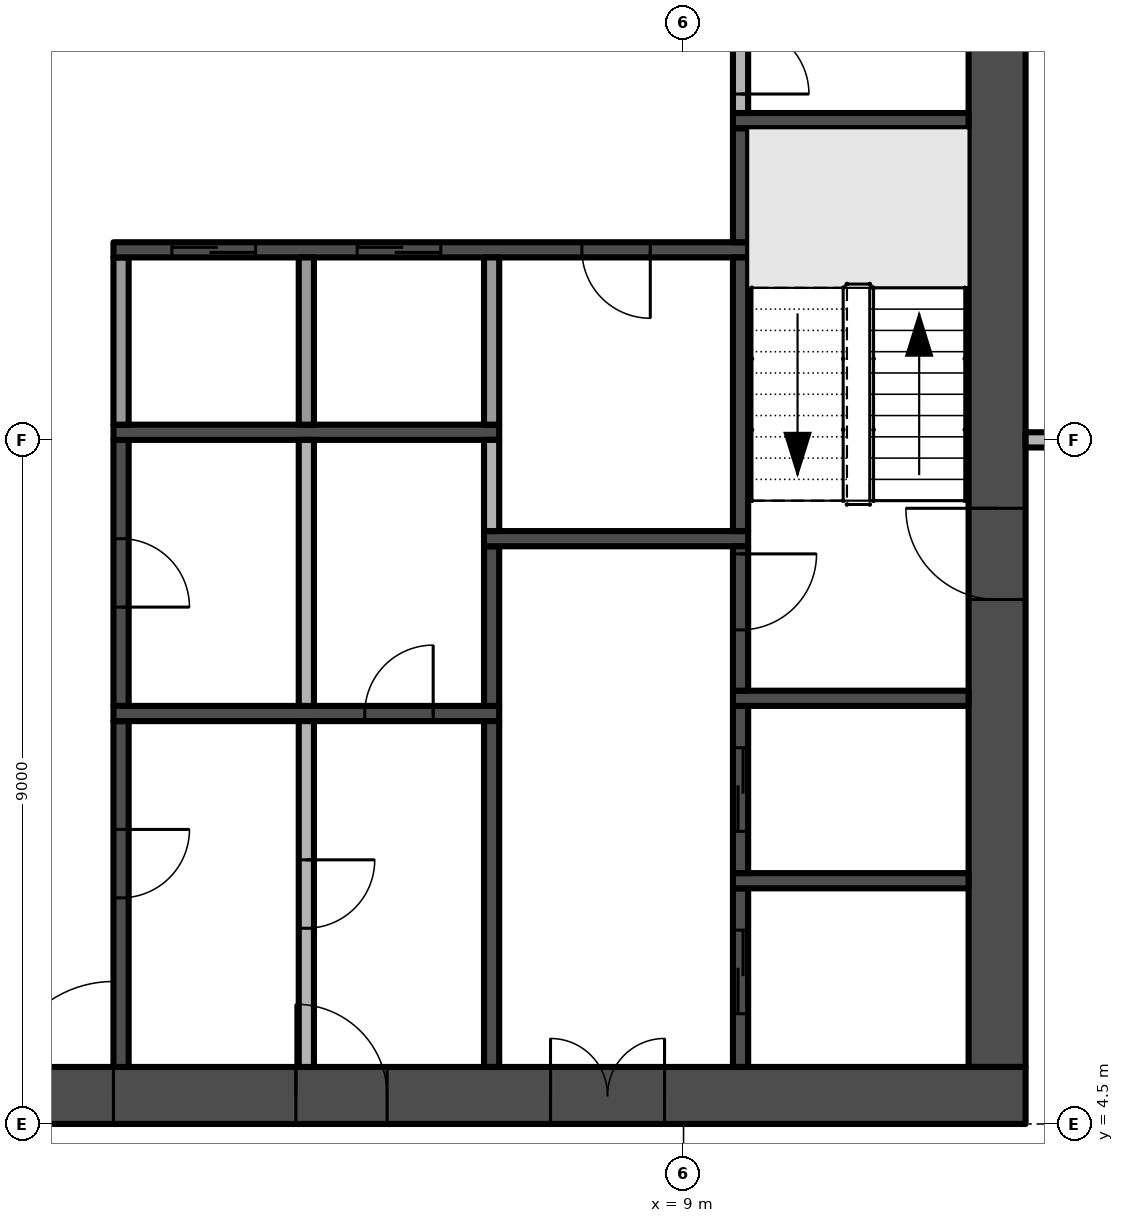
"""IFC4 building model, lengths in metres.
Left out: names, types, materials, properties, quantities, classifications, styles, units other than length and angle.
Written with IfcOpenShell. Run it as: python <this file> out.ifc"""

import sys

from ifc_helpers import new_model, si_unit, direction, frame, frame_2d, origin, place, context, subcontext, project, spatial, rectangle, extrude, element, fill, save


model = new_model("IFC4")
c1 = context("Model", 3, precision=1e-05, world=origin(), true_north=direction((0.0, 1.0)))
c2 = subcontext(c1, "Body", "Model", "MODEL_VIEW")
j1 = project(units=[si_unit("LENGTHUNIT", "METRE"), si_unit("PLANEANGLEUNIT", "RADIAN")], contexts=[c1])
p1 = place(None, origin())
s1 = spatial("IfcSite", under=j1, at=p1, CompositionType="ELEMENT")
p2 = place(p1, origin())
s2 = spatial("IfcBuilding", under=s1, at=p2, CompositionType="ELEMENT")
p3 = place(p2, frame((0.0, 0.0, 136.4)))
s3 = spatial("IfcBuildingStorey", under=s2, at=p3, CompositionType="ELEMENT", Elevation=136.4)
p4 = place(p3, frame((-13.5, 4.875, -0.3), z_axis=(0.0, 0.0, 1.0), x_axis=(1.0, 0.0, 0.0)))
e1 = element("IfcWall", 1, at=p4, inside=s3, PredefinedType="SHEAR", context=c2, shape_type="SweptSolid", body=[
    extrude(rectangle(XDim=27.0, YDim=0.75, at=frame_2d((13.5, 0.0))), origin(), (0.0, 0.0, 1.0), 3.8),
])
p5 = place(p4, frame((12.0, 0.0, 0.3)))
e2 = element("IfcOpeningElement", 2, at=p5, cuts=e1, PredefinedType="OPENING", context=c2, shape_type="SweptSolid", body=[
    extrude(rectangle(XDim=3.0, YDim=2.4, at=frame_2d((1.5, 1.2))), frame((0.0, 0.385, 0.0), z_axis=(0.0, -1.0, 0.0), x_axis=(1.0, 0.0, 0.0)), (0.0, 0.0, 1.0), 0.77),
])
p6 = place(p4, frame((4.9, 0.0, 0.3)))
e3 = element("IfcOpeningElement", 3, at=p6, cuts=e1, PredefinedType="OPENING", context=c2, shape_type="SweptSolid", body=[
    extrude(rectangle(XDim=1.2, YDim=2.2, at=frame_2d((0.6, 1.1))), frame((0.0, 0.385, 0.0), z_axis=(0.0, -1.0, 0.0), x_axis=(1.0, 0.0, 0.0)), (0.0, 0.0, 1.0), 0.77),
])
p7 = place(p4, frame((20.75, 0.0, 0.3)))
e4 = element("IfcOpeningElement", 4, at=p7, cuts=e1, PredefinedType="OPENING", context=c2, shape_type="SweptSolid", body=[
    extrude(rectangle(XDim=1.5, YDim=2.2, at=frame_2d((0.75, 1.1))), frame((0.0, 0.385, 0.0), z_axis=(0.0, -1.0, 0.0), x_axis=(1.0, 0.0, 0.0)), (0.0, 0.0, 1.0), 0.77),
])
p8 = place(p4, frame((17.4, 0.0, 0.3)))
e5 = element("IfcOpeningElement", 5, at=p8, cuts=e1, PredefinedType="OPENING", context=c2, shape_type="SweptSolid", body=[
    extrude(rectangle(XDim=1.2, YDim=2.2, at=frame_2d((0.6, 1.1))), frame((0.0, 0.385, 0.0), z_axis=(0.0, -1.0, 0.0), x_axis=(1.0, 0.0, 0.0)), (0.0, 0.0, 1.0), 0.77),
])
p9 = place(p3, frame((13.125, 5.25, -0.3), z_axis=(0.0, 0.0, 1.0), x_axis=(0.0, 1.0, 0.0)))
e6 = element("IfcWall", 6, at=p9, inside=s3, PredefinedType="SHEAR", context=c2, shape_type="SweptSolid", body=[
    extrude(rectangle(XDim=16.5, YDim=0.75, at=frame_2d((8.25, 0.0))), origin(), (0.0, 0.0, 1.0), 3.8),
])
p10 = place(p9, frame((6.15, 0.0, 0.3)))
e7 = element("IfcOpeningElement", 7, at=p10, cuts=e6, PredefinedType="OPENING", context=c2, shape_type="SweptSolid", body=[
    extrude(rectangle(XDim=1.2, YDim=2.2, at=frame_2d((0.6, 1.1))), frame((0.0, 0.385, 0.0), z_axis=(0.0, -1.0, 0.0), x_axis=(1.0, 0.0, 0.0)), (0.0, 0.0, 1.0), 0.77),
])
p11 = place(p3, frame((1.6, 9.8, 0.0), z_axis=(0.0, 0.0, 1.0), x_axis=(0.0, -1.0, 0.0)))
e8 = element("IfcWall", 8, at=p11, inside=s3, PredefinedType="SHEAR", context=c2, shape_type="SweptSolid", body=[
    extrude(rectangle(XDim=4.55, YDim=0.2, at=frame_2d((2.275, 0.0))), origin(), (0.0, 0.0, 1.0), 3.5),
])
p12 = place(p11, frame((1.425, 0.0, 0.0)))
e9 = element("IfcOpeningElement", 9, at=p12, cuts=e8, PredefinedType="OPENING", context=c2, shape_type="SweptSolid", body=[
    extrude(rectangle(XDim=0.9, YDim=2.1, at=frame_2d((0.45, 1.05))), frame((0.0, 0.11, 0.0), z_axis=(0.0, -1.0, 0.0), x_axis=(1.0, 0.0, 0.0)), (0.0, 0.0, 1.0), 0.22),
])
p13 = place(p3, frame((1.5, 9.9, 0.0), z_axis=(0.0, 0.0, 1.0), x_axis=(1.0, 0.0, 0.0)))
e10 = element("IfcWall", 10, at=p13, inside=s3, PredefinedType="SHEAR", context=c2, shape_type="SweptSolid", body=[
    extrude(rectangle(XDim=5.075, YDim=0.2, at=frame_2d((2.538, 0.0))), origin(), (0.0, 0.0, 1.0), 3.5),
])
p14 = place(p13, frame((3.306, 0.0, 0.0)))
e11 = element("IfcOpeningElement", 11, at=p14, cuts=e10, PredefinedType="OPENING", context=c2, shape_type="SweptSolid", body=[
    extrude(rectangle(XDim=0.9, YDim=2.1, at=frame_2d((0.45, 1.05))), frame((0.0, 0.11, 0.0), z_axis=(0.0, -1.0, 0.0), x_axis=(1.0, 0.0, 0.0)), (0.0, 0.0, 1.0), 0.22),
])
p15 = place(p3, frame((1.6, 13.5, 0.0), z_axis=(0.0, 0.0, 1.0), x_axis=(0.0, -1.0, 0.0)))
e12 = element("IfcWall", 12, at=p15, inside=s3, PredefinedType="SHEAR", context=c2, shape_type="SweptSolid", body=[
    extrude(rectangle(XDim=3.5, YDim=0.2, at=frame_2d((1.75, 0.0))), origin(), (0.0, 0.0, 1.0), 3.5),
])
p16 = place(p15, frame((1.3, 0.0, 0.0)))
e13 = element("IfcOpeningElement", 13, at=p16, cuts=e12, PredefinedType="OPENING", context=c2, shape_type="SweptSolid", body=[
    extrude(rectangle(XDim=0.9, YDim=2.1, at=frame_2d((0.45, 1.05))), frame((0.0, 0.11, 0.0), z_axis=(0.0, -1.0, 0.0), x_axis=(1.0, 0.0, 0.0)), (0.0, 0.0, 1.0), 0.22),
])
p17 = place(p3, frame((1.5, 13.6, 0.0), z_axis=(0.0, 0.0, 1.0), x_axis=(1.0, 0.0, 0.0)))
e14 = element("IfcWall", 14, at=p17, inside=s3, PredefinedType="SHEAR", context=c2, shape_type="SweptSolid", body=[
    extrude(rectangle(XDim=5.075, YDim=0.2, at=frame_2d((2.538, 0.0))), origin(), (0.0, 0.0, 1.0), 3.5),
])
p18 = place(p3, frame((1.6, 13.7, 0.0), z_axis=(0.0, 0.0, 1.0), x_axis=(0.0, 1.0, 0.0)))
e15 = element("IfcWall", 15, at=p18, inside=s3, PredefinedType="PARTITIONING", context=c2, shape_type="SweptSolid", body=[
    extrude(rectangle(XDim=2.2, YDim=0.2, at=frame_2d((1.1, 0.0))), origin(), (0.0, 0.0, 1.0), 3.5),
])
p19 = place(p3, frame((9.85, 16.0, 0.0), z_axis=(0.0, 0.0, 1.0), x_axis=(-1.0, 0.0, 0.0)))
e16 = element("IfcWall", 16, at=p19, inside=s3, PredefinedType="SHEAR", context=c2, shape_type="SweptSolid", body=[
    extrude(rectangle(XDim=8.35, YDim=0.2, at=frame_2d((4.175, 0.0))), origin(), (0.0, 0.0, 1.0), 3.5),
])
p20 = place(p19, frame((6.481, 0.0, 0.0)))
e17 = element("IfcOpeningElement", 17, at=p20, cuts=e16, PredefinedType="OPENING", context=c2, shape_type="SweptSolid", body=[
    extrude(rectangle(XDim=1.1, YDim=2.1, at=frame_2d((0.55, 1.05))), frame((0.0, 0.11, 0.0), z_axis=(0.0, -1.0, 0.0), x_axis=(1.0, 0.0, 0.0)), (0.0, 0.0, 1.0), 0.22),
])
p21 = place(p19, frame((4.044, 0.0, 0.0)))
e18 = element("IfcOpeningElement", 18, at=p21, cuts=e16, PredefinedType="OPENING", context=c2, shape_type="SweptSolid", body=[
    extrude(rectangle(XDim=1.1, YDim=2.1, at=frame_2d((0.55, 1.05))), frame((0.0, 0.11, 0.0), z_axis=(0.0, -1.0, 0.0), x_axis=(1.0, 0.0, 0.0)), (0.0, 0.0, 1.0), 0.22),
])
p22 = place(p19, frame((1.288, 0.0, 0.0)))
e19 = element("IfcOpeningElement", 19, at=p22, cuts=e16, PredefinedType="OPENING", context=c2, shape_type="SweptSolid", body=[
    extrude(rectangle(XDim=0.9, YDim=2.1, at=frame_2d((0.45, 1.05))), frame((0.0, 0.11, 0.0), z_axis=(0.0, -1.0, 0.0), x_axis=(1.0, 0.0, 0.0)), (0.0, 0.0, 1.0), 0.22),
])
p23 = place(p3, frame((4.037, 9.8, 0.0), z_axis=(0.0, 0.0, 1.0), x_axis=(0.0, -1.0, 0.0)))
e20 = element("IfcWall", 20, at=p23, inside=s3, PredefinedType="PARTITIONING", context=c2, shape_type="SweptSolid", body=[
    extrude(rectangle(XDim=4.55, YDim=0.2, at=frame_2d((2.275, 0.0))), origin(), (0.0, 0.0, 1.0), 3.5),
])
p24 = place(p23, frame((1.825, 0.0, 0.0)))
e21 = element("IfcOpeningElement", 21, at=p24, cuts=e20, PredefinedType="OPENING", context=c2, shape_type="SweptSolid", body=[
    extrude(rectangle(XDim=0.9, YDim=2.1, at=frame_2d((0.45, 1.05))), frame((0.0, 0.11, 0.0), z_axis=(0.0, -1.0, 0.0), x_axis=(1.0, 0.0, 0.0)), (0.0, 0.0, 1.0), 0.22),
])
p25 = place(p3, frame((4.037, 10.0, 0.0), z_axis=(0.0, 0.0, 1.0), x_axis=(0.0, 1.0, 0.0)))
e22 = element("IfcWall", 22, at=p25, inside=s3, PredefinedType="PARTITIONING", context=c2, shape_type="SweptSolid", body=[
    extrude(rectangle(XDim=3.5, YDim=0.2, at=frame_2d((1.75, 0.0))), origin(), (0.0, 0.0, 1.0), 3.5),
])
p26 = place(p3, frame((4.037, 13.7, 0.0), z_axis=(0.0, 0.0, 1.0), x_axis=(0.0, 1.0, 0.0)))
e23 = element("IfcWall", 23, at=p26, inside=s3, PredefinedType="PARTITIONING", context=c2, shape_type="SweptSolid", body=[
    extrude(rectangle(XDim=2.2, YDim=0.2, at=frame_2d((1.1, 0.0))), origin(), (0.0, 0.0, 1.0), 3.5),
])
p27 = place(p3, frame((6.475, 5.25, 0.0), z_axis=(0.0, 0.0, 1.0), x_axis=(0.0, 1.0, 0.0)))
e24 = element("IfcWall", 24, at=p27, inside=s3, PredefinedType="SHEAR", context=c2, shape_type="SweptSolid", body=[
    extrude(rectangle(XDim=4.55, YDim=0.2, at=frame_2d((2.275, 0.0))), origin(), (0.0, 0.0, 1.0), 3.5),
])
p28 = place(p3, frame((6.475, 10.0, 0.0), z_axis=(0.0, 0.0, 1.0), x_axis=(0.0, 1.0, 0.0)))
e25 = element("IfcWall", 25, at=p28, inside=s3, PredefinedType="SHEAR", context=c2, shape_type="SweptSolid", body=[
    extrude(rectangle(XDim=2.1, YDim=0.2, at=frame_2d((1.05, 0.0))), origin(), (0.0, 0.0, 1.0), 3.5),
])
p29 = place(p3, frame((6.375, 12.2, 0.0), z_axis=(0.0, 0.0, 1.0), x_axis=(1.0, 0.0, 0.0)))
e26 = element("IfcWall", 26, at=p29, inside=s3, PredefinedType="SHEAR", context=c2, shape_type="SweptSolid", body=[
    extrude(rectangle(XDim=3.475, YDim=0.2, at=frame_2d((1.738, 0.0))), origin(), (0.0, 0.0, 1.0), 3.5),
])
p30 = place(p3, frame((6.475, 12.3, 0.0), z_axis=(0.0, 0.0, 1.0), x_axis=(0.0, 1.0, 0.0)))
e27 = element("IfcWall", 27, at=p30, inside=s3, PredefinedType="PARTITIONING", context=c2, shape_type="SweptSolid", body=[
    extrude(rectangle(XDim=1.2, YDim=0.2, at=frame_2d((0.6, 0.0))), origin(), (0.0, 0.0, 1.0), 3.5),
])
p31 = place(p3, frame((6.475, 13.7, 0.0), z_axis=(0.0, 0.0, 1.0), x_axis=(0.0, 1.0, 0.0)))
e28 = element("IfcWall", 28, at=p31, inside=s3, PredefinedType="PARTITIONING", context=c2, shape_type="SweptSolid", body=[
    extrude(rectangle(XDim=2.2, YDim=0.2, at=frame_2d((1.1, 0.0))), origin(), (0.0, 0.0, 1.0), 3.5),
])
p32 = place(p3, frame((9.75, 5.25, 0.0), z_axis=(0.0, 0.0, 1.0), x_axis=(0.0, 1.0, 0.0)))
e29 = element("IfcWall", 29, at=p32, inside=s3, PredefinedType="SHEAR", context=c2, shape_type="SweptSolid", body=[
    extrude(rectangle(XDim=2.35, YDim=0.2, at=frame_2d((1.175, 0.0))), origin(), (0.0, 0.0, 1.0), 3.5),
])
p33 = place(p32, frame((0.7, 0.0, 0.0)))
e30 = element("IfcOpeningElement", 30, at=p33, cuts=e29, PredefinedType="OPENING", context=c2, shape_type="SweptSolid", body=[
    extrude(rectangle(XDim=1.1, YDim=2.1, at=frame_2d((0.55, 1.05))), frame((0.0, 0.11, 0.0), z_axis=(0.0, -1.0, 0.0), x_axis=(1.0, 0.0, 0.0)), (0.0, 0.0, 1.0), 0.22),
])
p34 = place(p3, frame((9.65, 7.7, 0.0), z_axis=(0.0, 0.0, 1.0), x_axis=(1.0, 0.0, 0.0)))
e31 = element("IfcWall", 31, at=p34, inside=s3, PredefinedType="SHEAR", context=c2, shape_type="SweptSolid", body=[
    extrude(rectangle(XDim=3.1, YDim=0.2, at=frame_2d((1.55, 0.0))), origin(), (0.0, 0.0, 1.0), 3.5),
])
p35 = place(p3, frame((9.75, 7.8, 0.0), z_axis=(0.0, 0.0, 1.0), x_axis=(0.0, 1.0, 0.0)))
e32 = element("IfcWall", 32, at=p35, inside=s3, PredefinedType="SHEAR", context=c2, shape_type="SweptSolid", body=[
    extrude(rectangle(XDim=2.2, YDim=0.2, at=frame_2d((1.1, 0.0))), origin(), (0.0, 0.0, 1.0), 3.5),
])
p36 = place(p35, frame((0.55, 0.0, 0.0)))
e33 = element("IfcOpeningElement", 33, at=p36, cuts=e32, PredefinedType="OPENING", context=c2, shape_type="SweptSolid", body=[
    extrude(rectangle(XDim=1.1, YDim=2.1, at=frame_2d((0.55, 1.05))), frame((0.0, 0.11, 0.0), z_axis=(0.0, -1.0, 0.0), x_axis=(1.0, 0.0, 0.0)), (0.0, 0.0, 1.0), 0.22),
])
p37 = place(p3, frame((9.65, 10.1, 0.0), z_axis=(0.0, 0.0, 1.0), x_axis=(1.0, 0.0, 0.0)))
e34 = element("IfcWall", 34, at=p37, inside=s3, PredefinedType="SHEAR", context=c2, shape_type="SweptSolid", body=[
    extrude(rectangle(XDim=3.1, YDim=0.2, at=frame_2d((1.55, 0.0))), origin(), (0.0, 0.0, 1.0), 3.5),
])
p38 = place(p3, frame((9.75, 12.1, 0.0), z_axis=(0.0, 0.0, 1.0), x_axis=(0.0, -1.0, 0.0)))
e35 = element("IfcWall", 35, at=p38, inside=s3, PredefinedType="SHEAR", context=c2, shape_type="SweptSolid", body=[
    extrude(rectangle(XDim=1.9, YDim=0.2, at=frame_2d((0.95, 0.0))), origin(), (0.0, 0.0, 1.0), 3.5),
])
p39 = place(p38, frame((0.1, 0.0, 0.0)))
e36 = element("IfcOpeningElement", 36, at=p39, cuts=e35, PredefinedType="OPENING", context=c2, shape_type="SweptSolid", body=[
    extrude(rectangle(XDim=1.0, YDim=2.2, at=frame_2d((0.5, 1.1))), frame((0.0, 0.11, 0.0), z_axis=(0.0, -1.0, 0.0), x_axis=(1.0, 0.0, 0.0)), (0.0, 0.0, 1.0), 0.22),
])
p40 = place(p3, frame((9.75, 12.3, 0.0), z_axis=(0.0, 0.0, 1.0), x_axis=(0.0, 1.0, 0.0)))
e37 = element("IfcWall", 37, at=p40, inside=s3, PredefinedType="SHEAR", context=c2, shape_type="SweptSolid", body=[
    extrude(rectangle(XDim=3.6, YDim=0.2, at=frame_2d((1.8, 0.0))), origin(), (0.0, 0.0, 1.0), 3.5),
])
p41 = place(p3, frame((9.75, 16.1, 0.0), z_axis=(0.0, 0.0, 1.0), x_axis=(0.0, 1.0, 0.0)))
e38 = element("IfcWall", 38, at=p41, inside=s3, PredefinedType="SHEAR", context=c2, shape_type="SweptSolid", body=[
    extrude(rectangle(XDim=1.5, YDim=0.2, at=frame_2d((0.75, 0.0))), origin(), (0.0, 0.0, 1.0), 3.5),
])
p42 = place(p3, frame((9.65, 17.7, 0.0), z_axis=(0.0, 0.0, 1.0), x_axis=(1.0, 0.0, 0.0)))
e39 = element("IfcWall", 39, at=p42, inside=s3, PredefinedType="SHEAR", context=c2, shape_type="SweptSolid", body=[
    extrude(rectangle(XDim=3.1, YDim=0.2, at=frame_2d((1.55, 0.0))), origin(), (0.0, 0.0, 1.0), 3.5),
])
p43 = place(p3, frame((9.75, 19.2, 0.0), z_axis=(0.0, 0.0, 1.0), x_axis=(0.0, -1.0, 0.0)))
e40 = element("IfcWall", 40, at=p43, inside=s3, PredefinedType="PARTITIONING", context=c2, shape_type="SweptSolid", body=[
    extrude(rectangle(XDim=1.4, YDim=0.2, at=frame_2d((0.7, 0.0))), origin(), (0.0, 0.0, 1.0), 3.5),
])
p44 = place(p43, frame((0.25, 0.0, 0.0)))
e41 = element("IfcOpeningElement", 41, at=p44, cuts=e40, PredefinedType="OPENING", context=c2, shape_type="SweptSolid", body=[
    extrude(rectangle(XDim=0.9, YDim=2.1, at=frame_2d((0.45, 1.05))), frame((0.0, 0.11, 0.0), z_axis=(0.0, -1.0, 0.0), x_axis=(1.0, 0.0, 0.0)), (0.0, 0.0, 1.0), 0.22),
])
p45 = place(p3, frame((13.5, 13.5, 0.0), z_axis=(0.0, 0.0, 1.0), x_axis=(1.0, 0.0, 0.0)))
e42 = element("IfcWall", 42, at=p45, inside=s3, PredefinedType="PARTITIONING", context=c2, shape_type="SweptSolid", body=[
    extrude(rectangle(XDim=3.85, YDim=0.2, at=frame_2d((1.925, 0.0))), origin(), (0.0, 0.0, 1.0), 3.5),
])
p46 = place(p45, frame((1.6, 0.0, 0.0)))
e43 = element("IfcOpeningElement", 43, at=p46, cuts=e42, PredefinedType="OPENING", context=c2, shape_type="SweptSolid", body=[
    extrude(rectangle(XDim=0.9, YDim=2.1, at=frame_2d((0.45, 1.05))), frame((0.0, 0.11, 0.0), z_axis=(0.0, -1.0, 0.0), x_axis=(1.0, 0.0, 0.0)), (0.0, 0.0, 1.0), 0.22),
])
p47 = place(p5, frame((3.0, 0.0, 0.0), z_axis=(0.0, 0.0, 1.0), x_axis=(-1.0, 0.0, 0.0)))
e44 = element("IfcDoor", 44, at=p47, inside=s3, OperationType="DOUBLE_DOOR_SINGLE_SWING", PredefinedType="DOOR", context=c2, shape_type="SweptSolid", body=[
    extrude(rectangle(XDim=3.0, YDim=2.4, at=frame_2d((1.5, 1.2))), frame((0.0, 0.025, 0.0), z_axis=(0.0, -1.0, 0.0), x_axis=(1.0, 0.0, 0.0)), (0.0, 0.0, 1.0), 0.05),
])
fill(e2, e44)
p48 = place(p10, frame((1.2, 0.0, 0.0), z_axis=(0.0, 0.0, 1.0), x_axis=(-1.0, 0.0, 0.0)))
e45 = element("IfcDoor", 45, at=p48, inside=s3, OperationType="SINGLE_SWING_LEFT", PredefinedType="DOOR", context=c2, shape_type="SweptSolid", body=[
    extrude(rectangle(XDim=1.2, YDim=2.2, at=frame_2d((0.6, 1.1))), frame((0.0, 0.025, 0.0), z_axis=(0.0, -1.0, 0.0), x_axis=(1.0, 0.0, 0.0)), (0.0, 0.0, 1.0), 0.05),
])
fill(e7, e45)
p49 = place(p7, frame((1.5, 0.0, 0.0), z_axis=(0.0, 0.0, 1.0), x_axis=(-1.0, 0.0, 0.0)))
e46 = element("IfcDoor", 46, at=p49, inside=s3, OperationType="DOUBLE_DOOR_SINGLE_SWING", PredefinedType="DOOR", context=c2, shape_type="SweptSolid", body=[
    extrude(rectangle(XDim=1.5, YDim=2.2, at=frame_2d((0.75, 1.1))), frame((0.0, 0.025, 0.0), z_axis=(0.0, -1.0, 0.0), x_axis=(1.0, 0.0, 0.0)), (0.0, 0.0, 1.0), 0.05),
])
fill(e4, e46)
p50 = place(p8, frame((1.2, 0.0, 0.0), z_axis=(0.0, 0.0, 1.0), x_axis=(-1.0, 0.0, 0.0)))
e47 = element("IfcDoor", 47, at=p50, inside=s3, OperationType="SINGLE_SWING_RIGHT", PredefinedType="DOOR", context=c2, shape_type="SweptSolid", body=[
    extrude(rectangle(XDim=1.2, YDim=2.2, at=frame_2d((0.6, 1.1))), frame((0.0, 0.025, 0.0), z_axis=(0.0, -1.0, 0.0), x_axis=(1.0, 0.0, 0.0)), (0.0, 0.0, 1.0), 0.05),
])
fill(e5, e47)
p51 = place(p39, origin())
e48 = element("IfcDoor", 48, at=p51, inside=s3, OperationType="SINGLE_SWING_LEFT", PredefinedType="DOOR", context=c2, shape_type="SweptSolid", body=[
    extrude(rectangle(XDim=1.0, YDim=2.2, at=frame_2d((0.5, 1.1))), frame((0.0, 0.025, 0.0), z_axis=(0.0, -1.0, 0.0), x_axis=(1.0, 0.0, 0.0)), (0.0, 0.0, 1.0), 0.05),
])
fill(e36, e48)
p52 = place(p20, origin())
e49 = element("IfcDoor", 49, at=p52, inside=s3, OperationType="SLIDING_TO_RIGHT", PredefinedType="DOOR", context=c2, shape_type="SweptSolid", body=[
    extrude(rectangle(XDim=1.1, YDim=2.1, at=frame_2d((0.55, 1.05))), frame((0.0, 0.025, 0.0), z_axis=(0.0, -1.0, 0.0), x_axis=(1.0, 0.0, 0.0)), (0.0, 0.0, 1.0), 0.05),
])
fill(e17, e49)
p53 = place(p21, origin())
e50 = element("IfcDoor", 50, at=p53, inside=s3, OperationType="SLIDING_TO_RIGHT", PredefinedType="DOOR", context=c2, shape_type="SweptSolid", body=[
    extrude(rectangle(XDim=1.1, YDim=2.1, at=frame_2d((0.55, 1.05))), frame((0.0, 0.025, 0.0), z_axis=(0.0, -1.0, 0.0), x_axis=(1.0, 0.0, 0.0)), (0.0, 0.0, 1.0), 0.05),
])
fill(e18, e50)
p54 = place(p33, origin())
e51 = element("IfcDoor", 51, at=p54, inside=s3, OperationType="SLIDING_TO_RIGHT", PredefinedType="DOOR", context=c2, shape_type="SweptSolid", body=[
    extrude(rectangle(XDim=1.1, YDim=2.1, at=frame_2d((0.55, 1.05))), frame((0.0, 0.025, 0.0), z_axis=(0.0, -1.0, 0.0), x_axis=(1.0, 0.0, 0.0)), (0.0, 0.0, 1.0), 0.05),
])
fill(e30, e51)
p55 = place(p36, origin())
e52 = element("IfcDoor", 52, at=p55, inside=s3, OperationType="SLIDING_TO_RIGHT", PredefinedType="DOOR", context=c2, shape_type="SweptSolid", body=[
    extrude(rectangle(XDim=1.1, YDim=2.1, at=frame_2d((0.55, 1.05))), frame((0.0, 0.025, 0.0), z_axis=(0.0, -1.0, 0.0), x_axis=(1.0, 0.0, 0.0)), (0.0, 0.0, 1.0), 0.05),
])
fill(e33, e52)
p56 = place(p12, origin())
e53 = element("IfcDoor", 53, at=p56, inside=s3, OperationType="SINGLE_SWING_LEFT", PredefinedType="DOOR", context=c2, shape_type="SweptSolid", body=[
    extrude(rectangle(XDim=0.9, YDim=2.1, at=frame_2d((0.45, 1.05))), frame((0.0, 0.025, 0.0), z_axis=(0.0, -1.0, 0.0), x_axis=(1.0, 0.0, 0.0)), (0.0, 0.0, 1.0), 0.05),
])
fill(e9, e53)
p57 = place(p24, origin())
e54 = element("IfcDoor", 54, at=p57, inside=s3, OperationType="SINGLE_SWING_LEFT", PredefinedType="DOOR", context=c2, shape_type="SweptSolid", body=[
    extrude(rectangle(XDim=0.9, YDim=2.1, at=frame_2d((0.45, 1.05))), frame((0.0, 0.025, 0.0), z_axis=(0.0, -1.0, 0.0), x_axis=(1.0, 0.0, 0.0)), (0.0, 0.0, 1.0), 0.05),
])
fill(e21, e54)
p58 = place(p16, origin())
e55 = element("IfcDoor", 55, at=p58, inside=s3, OperationType="SINGLE_SWING_RIGHT", PredefinedType="DOOR", context=c2, shape_type="SweptSolid", body=[
    extrude(rectangle(XDim=0.9, YDim=2.1, at=frame_2d((0.45, 1.05))), frame((0.0, 0.025, 0.0), z_axis=(0.0, -1.0, 0.0), x_axis=(1.0, 0.0, 0.0)), (0.0, 0.0, 1.0), 0.05),
])
fill(e13, e55)
p59 = place(p14, origin())
e56 = element("IfcDoor", 56, at=p59, inside=s3, OperationType="SINGLE_SWING_RIGHT", PredefinedType="DOOR", context=c2, shape_type="SweptSolid", body=[
    extrude(rectangle(XDim=0.9, YDim=2.1, at=frame_2d((0.45, 1.05))), frame((0.0, 0.025, 0.0), z_axis=(0.0, -1.0, 0.0), x_axis=(1.0, 0.0, 0.0)), (0.0, 0.0, 1.0), 0.05),
])
fill(e11, e56)
p60 = place(p22, origin())
e57 = element("IfcDoor", 57, at=p60, inside=s3, OperationType="SINGLE_SWING_LEFT", PredefinedType="DOOR", context=c2, shape_type="SweptSolid", body=[
    extrude(rectangle(XDim=0.9, YDim=2.1, at=frame_2d((0.45, 1.05))), frame((0.0, 0.025, 0.0), z_axis=(0.0, -1.0, 0.0), x_axis=(1.0, 0.0, 0.0)), (0.0, 0.0, 1.0), 0.05),
])
fill(e19, e57)
p61 = place(p44, origin())
e58 = element("IfcDoor", 58, at=p61, inside=s3, OperationType="SINGLE_SWING_RIGHT", PredefinedType="DOOR", context=c2, shape_type="SweptSolid", body=[
    extrude(rectangle(XDim=0.9, YDim=2.1, at=frame_2d((0.45, 1.05))), frame((0.0, 0.025, 0.0), z_axis=(0.0, -1.0, 0.0), x_axis=(1.0, 0.0, 0.0)), (0.0, 0.0, 1.0), 0.05),
])
fill(e41, e58)
save(model, sys.argv[1])
